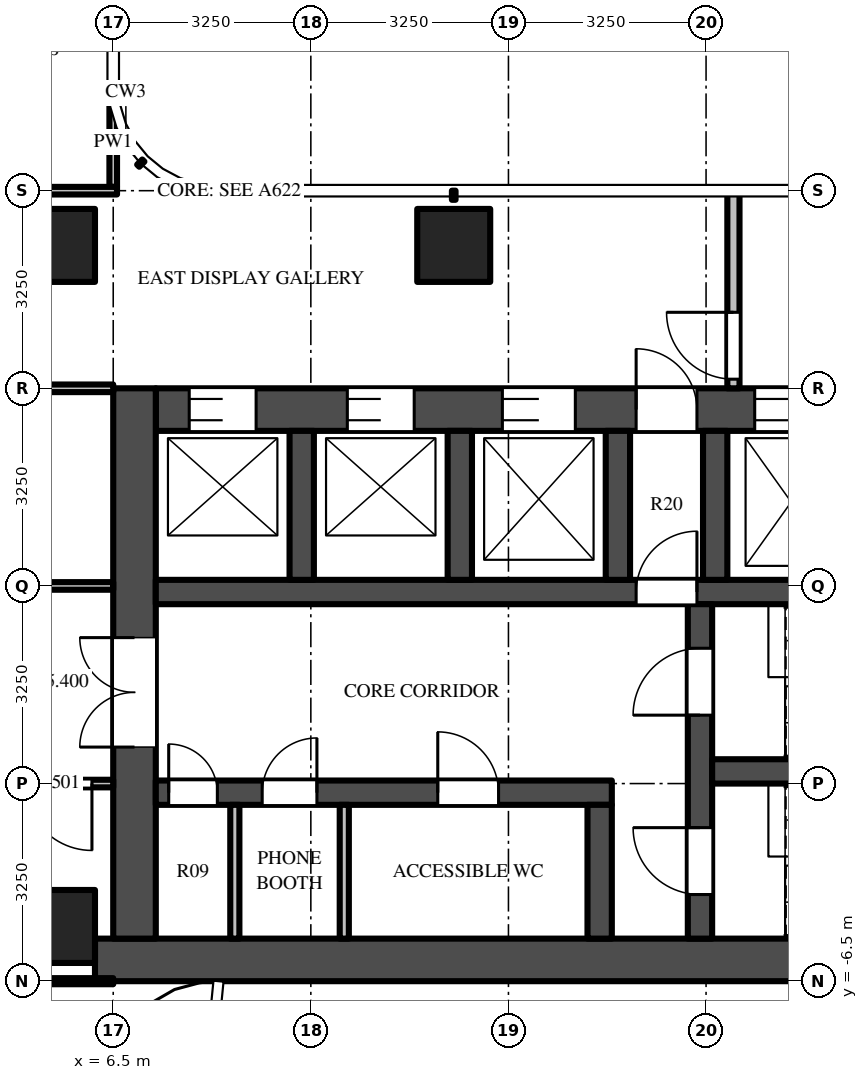
"""IFC4 building model, lengths in metres.
Left out: names, types, materials, properties, quantities, classifications, styles, units other than length and angle.
Written with IfcOpenShell. Run it as: python <this file> out.ifc"""

import sys

from ifc_helpers import new_model, si_unit, direction, frame, frame_2d, origin, origin_2d, place, context, subcontext, project, spatial, rectangle, extrude, source, transform, mapped, element, fill, save


model = new_model("IFC4")
c1 = context("Model", 3, precision=1e-05, world=origin(), true_north=direction((0.0, 1.0)))
c2 = subcontext(c1, "Body", "Model", "MODEL_VIEW")
j1 = project(units=[si_unit("LENGTHUNIT", "METRE"), si_unit("PLANEANGLEUNIT", "RADIAN")], contexts=[c1])
p1 = place(None, origin())
s1 = spatial("IfcSite", under=j1, at=p1, CompositionType="ELEMENT")
p2 = place(p1, origin())
s2 = spatial("IfcBuilding", under=s1, at=p2, CompositionType="ELEMENT")
p3 = place(p2, frame((0.0, 0.0, 185.4)))
s3 = spatial("IfcBuildingStorey", under=s2, at=p3, CompositionType="ELEMENT", Elevation=185.4)
m1 = source(origin(), c2, "Body", "SweptSolid", [
    extrude(rectangle(XDim=1.2, YDim=1.2, at=origin_2d()), origin(), (0.0, 0.0, 1.0), 3.9),
])
for number, where, z_axis, x_axis in (
    (1, (12.1, 5.6, 0.0), (0.0, 0.0, 1.0), (1.0, 0.0, 0.0)),
    (2, (5.6, 5.6, 0.0), (0.0, 0.0, 1.0), (1.0, 0.0, 0.0)),
    (3, (5.6, -5.6, 0.0), (0.0, 0.0, 1.0), (1.0, 0.0, 0.0)),
):
    element("IfcColumn", number, at=place(p3, frame(where, z_axis=z_axis, x_axis=x_axis)), inside=s3, PredefinedType="COLUMN", context=c2, shape_type="MappedRepresentation", body=[
        mapped(m1, transform((0.0, 0.0, 0.0))),
    ])
m2 = source(origin(), c2, "Body", "SweptSolid", [
    extrude(rectangle(XDim=16.55, YDim=0.7, at=frame_2d((8.275, 0.0))), origin(), (0.0, 0.0, 1.0), 3.7),
])
p4 = place(p3, frame((6.2, -6.15, 0.0), z_axis=(0.0, 0.0, 1.0), x_axis=(1.0, 0.0, 0.0)))
e4 = element("IfcWall", 4, at=p4, inside=s3, PredefinedType="SHEAR", context=c2, shape_type="MappedRepresentation", body=[
    mapped(m2, transform((0.0, 0.0, 0.0))),
])
m3 = source(origin(), c2, "Body", "SweptSolid", [
    extrude(rectangle(XDim=14.85, YDim=0.7, at=frame_2d((7.425, 0.0))), origin(), (0.0, 0.0, 1.0), 3.7),
])
p5 = place(p3, frame((7.2, 2.9, 0.0), z_axis=(0.0, 0.0, 1.0), x_axis=(1.0, 0.0, 0.0)))
e5 = element("IfcWall", 5, at=p5, inside=s3, PredefinedType="SHEAR", context=c2, shape_type="MappedRepresentation", body=[
    mapped(m3, transform((0.0, 0.0, 0.0))),
])
m4 = source(origin(), c2, "Body", "SweptSolid", [
    extrude(rectangle(XDim=1.1, YDim=2.1, at=frame_2d((0.55, 1.05))), frame((0.0, 0.36, 0.0), z_axis=(0.0, -1.0, 0.0), x_axis=(1.0, 0.0, 0.0)), (0.0, 0.0, 1.0), 0.72),
])
p6 = place(p5, frame((0.55, 0.0, 0.0)))
e6 = element("IfcOpeningElement", 6, at=p6, cuts=e5, PredefinedType="OPENING", context=c2, shape_type="MappedRepresentation", body=[
    mapped(m4, transform((0.0, 0.0, 0.0))),
])
p7 = place(p5, frame((3.15, 0.0, 0.0)))
e7 = element("IfcOpeningElement", 7, at=p7, cuts=e5, PredefinedType="OPENING", context=c2, shape_type="MappedRepresentation", body=[
    mapped(m4, transform((0.0, 0.0, 0.0))),
])
m5 = source(origin(), c2, "Body", "SweptSolid", [
    extrude(rectangle(XDim=1.2, YDim=2.1, at=frame_2d((0.6, 1.05))), frame((0.0, 0.36, 0.0), z_axis=(0.0, -1.0, 0.0), x_axis=(1.0, 0.0, 0.0)), (0.0, 0.0, 1.0), 0.72),
])
p8 = place(p5, frame((5.7, 0.0, 0.0)))
e8 = element("IfcOpeningElement", 8, at=p8, cuts=e5, PredefinedType="OPENING", context=c2, shape_type="MappedRepresentation", body=[
    mapped(m5, transform((0.0, 0.0, 0.0))),
])
m6 = source(origin(), c2, "Body", "SweptSolid", [
    extrude(rectangle(XDim=1.3, YDim=2.1, at=frame_2d((0.65, 1.05))), frame((0.0, 0.36, 0.0), z_axis=(0.0, -1.0, 0.0), x_axis=(1.0, 0.0, 0.0)), (0.0, 0.0, 1.0), 0.72),
])
p9 = place(p5, frame((12.2, 0.0, 0.0)))
e9 = element("IfcOpeningElement", 9, at=p9, cuts=e5, PredefinedType="OPENING", context=c2, shape_type="MappedRepresentation", body=[
    mapped(m6, transform((0.0, 0.0, 0.0))),
])
p10 = place(p5, frame((9.85, 0.0, 0.0)))
e10 = element("IfcOpeningElement", 10, at=p10, cuts=e5, PredefinedType="OPENING", context=c2, shape_type="MappedRepresentation", body=[
    mapped(m5, transform((0.0, 0.0, 0.0))),
])
m7 = source(origin(), c2, "Body", "SweptSolid", [
    extrude(rectangle(XDim=1.0, YDim=2.1, at=frame_2d((0.5, 1.05))), frame((0.0, 0.36, 0.0), z_axis=(0.0, -1.0, 0.0), x_axis=(1.0, 0.0, 0.0)), (0.0, 0.0, 1.0), 0.72),
])
p11 = place(p5, frame((7.9, 0.0, 0.0)))
e11 = element("IfcOpeningElement", 11, at=p11, cuts=e5, PredefinedType="OPENING", context=c2, shape_type="MappedRepresentation", body=[
    mapped(m7, transform((0.0, 0.0, 0.0))),
])
m8 = source(origin(), c2, "Body", "SweptSolid", [
    extrude(rectangle(XDim=9.05, YDim=0.7, at=frame_2d((4.525, 0.0))), origin(), (0.0, 0.0, 1.0), 3.7),
])
p12 = place(p3, frame((6.85, -5.8, 0.0), z_axis=(0.0, 0.0, 1.0), x_axis=(0.0, 1.0, 0.0)))
e12 = element("IfcWall", 12, at=p12, inside=s3, PredefinedType="SHEAR", context=c2, shape_type="MappedRepresentation", body=[
    mapped(m8, transform((0.0, 0.0, 0.0))),
])
m9 = source(origin(), c2, "Body", "SweptSolid", [
    extrude(rectangle(XDim=1.8, YDim=2.1, at=frame_2d((0.9, 1.05))), frame((0.0, 0.36, 0.0), z_axis=(0.0, -1.0, 0.0), x_axis=(1.0, 0.0, 0.0)), (0.0, 0.0, 1.0), 0.72),
])
p13 = place(p12, frame((3.15, 0.0, 0.0)))
e13 = element("IfcOpeningElement", 13, at=p13, cuts=e12, PredefinedType="OPENING", context=c2, shape_type="MappedRepresentation", body=[
    mapped(m9, transform((0.0, 0.0, 0.0))),
])
m10 = source(origin(), c2, "Body", "SweptSolid", [
    extrude(rectangle(XDim=7.5, YDim=0.4, at=frame_2d((3.75, 0.0))), origin(), (0.0, 0.0, 1.0), 3.7),
])
p14 = place(p3, frame((7.2, -3.4, 0.0), z_axis=(0.0, 0.0, 1.0), x_axis=(1.0, 0.0, 0.0)))
e14 = element("IfcWall", 14, at=p14, inside=s3, PredefinedType="SHEAR", context=c2, shape_type="MappedRepresentation", body=[
    mapped(m10, transform((0.0, 0.0, 0.0))),
])
m11 = source(origin(), c2, "Body", "SweptSolid", [
    extrude(rectangle(XDim=0.8, YDim=2.1, at=frame_2d((0.4, 1.05))), frame((0.0, 0.21, 0.0), z_axis=(0.0, -1.0, 0.0), x_axis=(1.0, 0.0, 0.0)), (0.0, 0.0, 1.0), 0.42),
])
p15 = place(p14, frame((0.212, 0.0, 0.0)))
e15 = element("IfcOpeningElement", 15, at=p15, cuts=e14, PredefinedType="OPENING", context=c2, shape_type="MappedRepresentation", body=[
    mapped(m11, transform((0.0, 0.0, 0.0))),
])
m12 = source(origin(), c2, "Body", "SweptSolid", [
    extrude(rectangle(XDim=0.9, YDim=2.1, at=frame_2d((0.45, 1.05))), frame((0.0, 0.21, 0.0), z_axis=(0.0, -1.0, 0.0), x_axis=(1.0, 0.0, 0.0)), (0.0, 0.0, 1.0), 0.42),
])
p16 = place(p14, frame((1.75, 0.0, 0.0)))
e16 = element("IfcOpeningElement", 16, at=p16, cuts=e14, PredefinedType="OPENING", context=c2, shape_type="MappedRepresentation", body=[
    mapped(m12, transform((0.0, 0.0, 0.0))),
])
m13 = source(origin(), c2, "Body", "SweptSolid", [
    extrude(rectangle(XDim=1.0, YDim=2.1, at=frame_2d((0.5, 1.05))), frame((0.0, 0.21, 0.0), z_axis=(0.0, -1.0, 0.0), x_axis=(1.0, 0.0, 0.0)), (0.0, 0.0, 1.0), 0.42),
])
p17 = place(p14, frame((4.637, 0.0, 0.0)))
e17 = element("IfcOpeningElement", 17, at=p17, cuts=e14, PredefinedType="OPENING", context=c2, shape_type="MappedRepresentation", body=[
    mapped(m13, transform((0.0, 0.0, 0.0))),
])
m14 = source(origin(), c2, "Body", "SweptSolid", [
    extrude(rectangle(XDim=14.85, YDim=0.4, at=frame_2d((7.425, 0.0))), origin(), (0.0, 0.0, 1.0), 3.7),
])
p18 = place(p3, frame((7.2, -0.1, 0.0), z_axis=(0.0, 0.0, 1.0), x_axis=(1.0, 0.0, 0.0)))
e18 = element("IfcWall", 18, at=p18, inside=s3, PredefinedType="SHEAR", context=c2, shape_type="MappedRepresentation", body=[
    mapped(m14, transform((0.0, 0.0, 0.0))),
])
p19 = place(p18, frame((7.9, 0.0, 0.0)))
e19 = element("IfcOpeningElement", 19, at=p19, cuts=e18, PredefinedType="OPENING", context=c2, shape_type="MappedRepresentation", body=[
    mapped(m13, transform((0.0, 0.0, 0.0))),
])
m15 = source(origin(), c2, "Body", "SweptSolid", [
    extrude(rectangle(XDim=5.5, YDim=0.4, at=frame_2d((2.75, 0.0))), origin(), (0.0, 0.0, 1.0), 3.7),
])
p20 = place(p3, frame((16.15, -5.8, 0.0), z_axis=(0.0, 0.0, 1.0), x_axis=(0.0, 1.0, 0.0)))
e20 = element("IfcWall", 20, at=p20, inside=s3, PredefinedType="SHEAR", context=c2, shape_type="MappedRepresentation", body=[
    mapped(m15, transform((0.0, 0.0, 0.0))),
])
m16 = source(origin(), c2, "Body", "SweptSolid", [
    extrude(rectangle(XDim=1.1, YDim=2.1, at=frame_2d((0.55, 1.05))), frame((0.0, 0.21, 0.0), z_axis=(0.0, -1.0, 0.0), x_axis=(1.0, 0.0, 0.0)), (0.0, 0.0, 1.0), 0.42),
])
p21 = place(p20, frame((0.725, 0.0, 0.0)))
e21 = element("IfcOpeningElement", 21, at=p21, cuts=e20, PredefinedType="OPENING", context=c2, shape_type="MappedRepresentation", body=[
    mapped(m16, transform((0.0, 0.0, 0.0))),
])
p22 = place(p20, frame((3.675, 0.0, 0.0)))
e22 = element("IfcOpeningElement", 22, at=p22, cuts=e20, PredefinedType="OPENING", context=c2, shape_type="MappedRepresentation", body=[
    mapped(m16, transform((0.0, 0.0, 0.0))),
])
m17 = source(origin(), c2, "Body", "SweptSolid", [
    extrude(rectangle(XDim=5.7, YDim=0.4, at=frame_2d((2.85, 0.0))), origin(), (0.0, 0.0, 1.0), 3.7),
])
p23 = place(p3, frame((16.35, -3.05, 0.0), z_axis=(0.0, 0.0, 1.0), x_axis=(1.0, 0.0, 0.0)))
e23 = element("IfcWall", 23, at=p23, inside=s3, PredefinedType="SHEAR", context=c2, shape_type="MappedRepresentation", body=[
    mapped(m17, transform((0.0, 0.0, 0.0))),
])
m18 = source(origin(), c2, "Body", "SweptSolid", [
    extrude(rectangle(XDim=2.2, YDim=0.4, at=frame_2d((1.1, 0.0))), origin(), (0.0, 0.0, 1.0), 3.7),
])
p24 = place(p3, frame((14.5, -5.8, 0.0), z_axis=(0.0, 0.0, 1.0), x_axis=(0.0, 1.0, 0.0)))
e24 = element("IfcWall", 24, at=p24, inside=s3, PredefinedType="SHEAR", context=c2, shape_type="MappedRepresentation", body=[
    mapped(m18, transform((0.0, 0.0, 0.0))),
])
m19 = source(origin(), c2, "Body", "SweptSolid", [
    extrude(rectangle(XDim=2.45, YDim=0.4, at=frame_2d((1.225, 0.0))), origin(), (0.0, 0.0, 1.0), 3.7),
])
for number, where, z_axis, x_axis in (
    (25, (9.6, 0.1, 0.0), (0.0, 0.0, 1.0), (0.0, 1.0, 0.0)),
    (26, (12.2, 0.1, 0.0), (0.0, 0.0, 1.0), (0.0, 1.0, 0.0)),
    (27, (14.8, 0.1, 0.0), (0.0, 0.0, 1.0), (0.0, 1.0, 0.0)),
    (28, (16.4, 0.1, 0.0), (0.0, 0.0, 1.0), (0.0, 1.0, 0.0)),
):
    element("IfcWall", number, at=place(p3, frame(where, z_axis=z_axis, x_axis=x_axis)), inside=s3, PredefinedType="SHEAR", context=c2, shape_type="MappedRepresentation", body=[
        mapped(m19, transform((0.0, 0.0, 0.0))),
    ])
m20 = source(origin(), c2, "Body", "SweptSolid", [
    extrude(rectangle(XDim=3.25, YDim=0.2, at=frame_2d((1.625, 0.0))), origin(), (0.0, 0.0, 1.0), 3.7),
])
p25 = place(p3, frame((16.7, 3.25, 0.0), z_axis=(0.0, 0.0, 1.0), x_axis=(0.0, 1.0, 0.0)))
e29 = element("IfcWall", 29, at=p25, inside=s3, PredefinedType="PARTITIONING", context=c2, shape_type="MappedRepresentation", body=[
    mapped(m20, transform((0.0, 0.0, 0.0))),
])
m21 = source(origin(), c2, "Body", "SweptSolid", [
    extrude(rectangle(XDim=1.1, YDim=2.1, at=frame_2d((0.55, 1.05))), frame((0.0, 0.11, 0.0), z_axis=(0.0, -1.0, 0.0), x_axis=(1.0, 0.0, 0.0)), (0.0, 0.0, 1.0), 0.22),
])
p26 = place(p25, frame((0.15, 0.0, 0.0)))
e30 = element("IfcOpeningElement", 30, at=p26, cuts=e29, PredefinedType="OPENING", context=c2, shape_type="MappedRepresentation", body=[
    mapped(m21, transform((0.0, 0.0, 0.0))),
])
m22 = source(origin(), c2, "Body", "SweptSolid", [
    extrude(rectangle(XDim=2.2, YDim=0.15, at=frame_2d((1.1, 0.0))), origin(), (0.0, 0.0, 1.0), 3.7),
])
for number, where, z_axis, x_axis in (
    (31, (8.5, -5.8, 0.0), (0.0, 0.0, 1.0), (0.0, 1.0, 0.0)),
    (32, (10.3, -5.8, 0.0), (0.0, 0.0, 1.0), (0.0, 1.0, 0.0)),
):
    element("IfcWall", number, at=place(p3, frame(where, z_axis=z_axis, x_axis=x_axis)), inside=s3, PredefinedType="PARTITIONING", context=c2, shape_type="MappedRepresentation", body=[
        mapped(m22, transform((0.0, 0.0, 0.0))),
    ])
m23 = source(origin(), c2, "Body", "SweptSolid", [
    extrude(rectangle(XDim=1.469, YDim=0.125, at=frame_2d((0.734, 0.0))), origin(), (0.0, 0.0, 1.0), 3.7),
])
p27 = place(p3, frame((6.5, 6.562, 0.0), z_axis=(0.0, 0.0, 1.0), x_axis=(0.0, 1.0, 0.0)))
e33 = element("IfcWall", 33, at=p27, inside=s3, PredefinedType="PARTITIONING", context=c2, shape_type="MappedRepresentation", body=[
    mapped(m23, transform((0.0, 0.0, 0.0))),
])
m24 = source(origin(), c2, "Body", "SweptSolid", [
    extrude(rectangle(XDim=5.363, YDim=0.1, at=frame_2d((2.681, 0.0))), origin(), (0.0, 0.0, 1.0), 2.78),
])
p28 = place(p3, frame((1.137, -6.5, 0.0), z_axis=(0.0, 0.0, 1.0), x_axis=(1.0, 0.0, 0.0)))
e34 = element("IfcWall", 34, at=p28, inside=s3, PredefinedType="PARTITIONING", context=c2, shape_type="MappedRepresentation", body=[
    mapped(m24, transform((0.0, 0.0, 0.0))),
])
m25 = source(origin(), c2, "Body", "SweptSolid", [
    extrude(rectangle(XDim=5.363, YDim=0.125, at=frame_2d((2.681, 0.0))), origin(), (0.0, 0.0, 1.0), 2.997),
])
p29 = place(p3, frame((6.5, -3.25, 0.0), z_axis=(0.0, 0.0, 1.0), x_axis=(-1.0, 0.0, 0.0)))
e35 = element("IfcWall", 35, at=p29, inside=s3, PredefinedType="PARTITIONING", context=c2, shape_type="MappedRepresentation", body=[
    mapped(m25, transform((0.0, 0.0, 0.0))),
])
m26 = source(origin(), c2, "Body", "SweptSolid", [
    extrude(rectangle(XDim=1.1, YDim=2.1, at=frame_2d((0.55, 1.05))), frame((0.0, 0.073, 0.0), z_axis=(0.0, -1.0, 0.0), x_axis=(1.0, 0.0, 0.0)), (0.0, 0.0, 1.0), 0.145),
])
p30 = place(p29, frame((0.35, 0.0, 0.0)))
e36 = element("IfcOpeningElement", 36, at=p30, cuts=e35, PredefinedType="OPENING", context=c2, shape_type="MappedRepresentation", body=[
    mapped(m26, transform((0.0, 0.0, 0.0))),
])
p31 = place(p3, frame((6.5, 0.0, 0.0), z_axis=(0.0, 0.0, 1.0), x_axis=(-1.0, 0.0, 0.0)))
e37 = element("IfcWall", 37, at=p31, inside=s3, PredefinedType="PARTITIONING", context=c2, shape_type="MappedRepresentation", body=[
    mapped(m25, transform((0.0, 0.0, 0.0))),
])
m27 = source(origin(), c2, "Body", "SweptSolid", [
    extrude(rectangle(XDim=1.0, YDim=2.1, at=frame_2d((0.5, 1.05))), frame((0.0, 0.073, 0.0), z_axis=(0.0, -1.0, 0.0), x_axis=(1.0, 0.0, 0.0)), (0.0, 0.0, 1.0), 0.145),
])
p32 = place(p31, frame((3.95, 0.0, 0.0)))
e38 = element("IfcOpeningElement", 38, at=p32, cuts=e37, PredefinedType="OPENING", context=c2, shape_type="MappedRepresentation", body=[
    mapped(m27, transform((0.0, 0.0, 0.0))),
])
p33 = place(p3, frame((1.137, 3.25, 0.0), z_axis=(0.0, 0.0, 1.0), x_axis=(1.0, 0.0, 0.0)))
e39 = element("IfcWall", 39, at=p33, inside=s3, PredefinedType="PARTITIONING", context=c2, shape_type="MappedRepresentation", body=[
    mapped(m25, transform((0.0, 0.0, 0.0))),
])
m28 = source(origin(), c2, "Body", "SweptSolid", [
    extrude(rectangle(XDim=3.725, YDim=0.125, at=frame_2d((1.863, 0.0))), origin(), (0.0, 0.0, 1.0), 2.78),
])
p34 = place(p3, frame((2.837, 6.5, 0.0), z_axis=(0.0, 0.0, 1.0), x_axis=(1.0, 0.0, 0.0)))
e40 = element("IfcWall", 40, at=p34, inside=s3, PredefinedType="PARTITIONING", context=c2, shape_type="MappedRepresentation", body=[
    mapped(m28, transform((0.0, 0.0, 0.0))),
])
m29 = source(origin(), c2, "Body", "SweptSolid", [
    extrude(rectangle(XDim=1.1, YDim=2.1, at=frame_2d((0.55, 1.05))), frame((0.0, -0.275, 0.0), z_axis=(0.0, -1.0, 0.0), x_axis=(1.0, 0.0, 0.0)), (0.0, 0.0, 1.0), 0.05),
])
p35 = place(p6, origin())
e41 = element("IfcDoor", 41, at=p35, inside=s3, OperationType="DOUBLE_DOOR_SLIDING", PredefinedType="DOOR", context=c2, shape_type="MappedRepresentation", body=[
    mapped(m29, transform((0.0, 0.0, 0.0))),
])
fill(e6, e41)
p36 = place(p7, origin())
e42 = element("IfcDoor", 42, at=p36, inside=s3, OperationType="DOUBLE_DOOR_SLIDING", PredefinedType="DOOR", context=c2, shape_type="MappedRepresentation", body=[
    mapped(m29, transform((0.0, 0.0, 0.0))),
])
fill(e7, e42)
m30 = source(origin(), c2, "Body", "SweptSolid", [
    extrude(rectangle(XDim=1.2, YDim=2.1, at=frame_2d((0.6, 1.05))), frame((0.0, -0.275, 0.0), z_axis=(0.0, -1.0, 0.0), x_axis=(1.0, 0.0, 0.0)), (0.0, 0.0, 1.0), 0.05),
])
p37 = place(p8, origin())
e43 = element("IfcDoor", 43, at=p37, inside=s3, OperationType="DOUBLE_DOOR_SLIDING", PredefinedType="DOOR", context=c2, shape_type="MappedRepresentation", body=[
    mapped(m30, transform((0.0, 0.0, 0.0))),
])
fill(e8, e43)
p38 = place(p10, origin())
e44 = element("IfcDoor", 44, at=p38, inside=s3, OperationType="DOUBLE_DOOR_SLIDING", PredefinedType="DOOR", context=c2, shape_type="MappedRepresentation", body=[
    mapped(m30, transform((0.0, 0.0, 0.0))),
])
fill(e10, e44)
m31 = source(origin(), c2, "Body", "SweptSolid", [
    extrude(rectangle(XDim=1.8, YDim=2.1, at=frame_2d((0.9, 1.05))), frame((0.0, -0.275, 0.0), z_axis=(0.0, -1.0, 0.0), x_axis=(1.0, 0.0, 0.0)), (0.0, 0.0, 1.0), 0.05),
])
p39 = place(p13, origin())
e45 = element("IfcDoor", 45, at=p39, inside=s3, OperationType="DOUBLE_DOOR_SINGLE_SWING", PredefinedType="DOOR", context=c2, shape_type="MappedRepresentation", body=[
    mapped(m31, transform((0.0, 0.0, 0.0))),
])
fill(e13, e45)
m32 = source(origin(), c2, "Body", "SweptSolid", [
    extrude(rectangle(XDim=1.1, YDim=2.1, at=frame_2d((0.55, 1.05))), frame((0.0, 0.025, 0.0), z_axis=(0.0, -1.0, 0.0), x_axis=(1.0, 0.0, 0.0)), (0.0, 0.0, 1.0), 0.05),
])
p40 = place(p21, origin())
e46 = element("IfcDoor", 46, at=p40, inside=s3, OperationType="SINGLE_SWING_RIGHT", PredefinedType="DOOR", context=c2, shape_type="MappedRepresentation", body=[
    mapped(m32, transform((0.0, 0.0, 0.0))),
])
fill(e21, e46)
p41 = place(p22, origin())
e47 = element("IfcDoor", 47, at=p41, inside=s3, OperationType="SINGLE_SWING_LEFT", PredefinedType="DOOR", context=c2, shape_type="MappedRepresentation", body=[
    mapped(m32, transform((0.0, 0.0, 0.0))),
])
fill(e22, e47)
m33 = source(origin(), c2, "Body", "SweptSolid", [
    extrude(rectangle(XDim=1.0, YDim=2.1, at=frame_2d((0.5, 1.05))), frame((0.0, 0.025, 0.0), z_axis=(0.0, -1.0, 0.0), x_axis=(1.0, 0.0, 0.0)), (0.0, 0.0, 1.0), 0.05),
])
p42 = place(p19, origin())
e48 = element("IfcDoor", 48, at=p42, inside=s3, OperationType="SINGLE_SWING_RIGHT", PredefinedType="DOOR", context=c2, shape_type="MappedRepresentation", body=[
    mapped(m33, transform((0.0, 0.0, 0.0))),
])
fill(e19, e48)
m34 = source(origin(), c2, "Body", "SweptSolid", [
    extrude(rectangle(XDim=1.0, YDim=2.1, at=frame_2d((0.5, 1.05))), frame((0.0, -0.275, 0.0), z_axis=(0.0, -1.0, 0.0), x_axis=(1.0, 0.0, 0.0)), (0.0, 0.0, 1.0), 0.05),
])
p43 = place(p11, origin())
e49 = element("IfcDoor", 49, at=p43, inside=s3, OperationType="SINGLE_SWING_LEFT", PredefinedType="DOOR", context=c2, shape_type="MappedRepresentation", body=[
    mapped(m34, transform((0.0, 0.0, 0.0))),
])
fill(e11, e49)
p44 = place(p26, origin())
e50 = element("IfcDoor", 50, at=p44, inside=s3, OperationType="SINGLE_SWING_RIGHT", PredefinedType="DOOR", context=c2, shape_type="MappedRepresentation", body=[
    mapped(m32, transform((0.0, 0.0, 0.0))),
])
fill(e30, e50)
m35 = source(origin(), c2, "Body", "SweptSolid", [
    extrude(rectangle(XDim=0.8, YDim=2.1, at=frame_2d((0.4, 1.05))), frame((0.0, 0.025, 0.0), z_axis=(0.0, -1.0, 0.0), x_axis=(1.0, 0.0, 0.0)), (0.0, 0.0, 1.0), 0.05),
])
p45 = place(p15, origin())
e51 = element("IfcDoor", 51, at=p45, inside=s3, OperationType="SINGLE_SWING_LEFT", PredefinedType="DOOR", context=c2, shape_type="MappedRepresentation", body=[
    mapped(m35, transform((0.0, 0.0, 0.0))),
])
fill(e15, e51)
m36 = source(origin(), c2, "Body", "SweptSolid", [
    extrude(rectangle(XDim=0.9, YDim=2.1, at=frame_2d((0.45, 1.05))), frame((0.0, 0.025, 0.0), z_axis=(0.0, -1.0, 0.0), x_axis=(1.0, 0.0, 0.0)), (0.0, 0.0, 1.0), 0.05),
])
p46 = place(p16, origin())
e52 = element("IfcDoor", 52, at=p46, inside=s3, OperationType="SINGLE_SWING_RIGHT", PredefinedType="DOOR", context=c2, shape_type="MappedRepresentation", body=[
    mapped(m36, transform((0.0, 0.0, 0.0))),
])
fill(e16, e52)
p47 = place(p17, origin())
e53 = element("IfcDoor", 53, at=p47, inside=s3, OperationType="SINGLE_SWING_LEFT", PredefinedType="DOOR", context=c2, shape_type="MappedRepresentation", body=[
    mapped(m33, transform((0.0, 0.0, 0.0))),
])
fill(e17, e53)
p48 = place(p30, origin())
e54 = element("IfcDoor", 54, at=p48, inside=s3, OperationType="SINGLE_SWING_LEFT", PredefinedType="DOOR", context=c2, shape_type="MappedRepresentation", body=[
    mapped(m32, transform((0.0, 0.0, 0.0))),
])
fill(e36, e54)
save(model, sys.argv[1])
